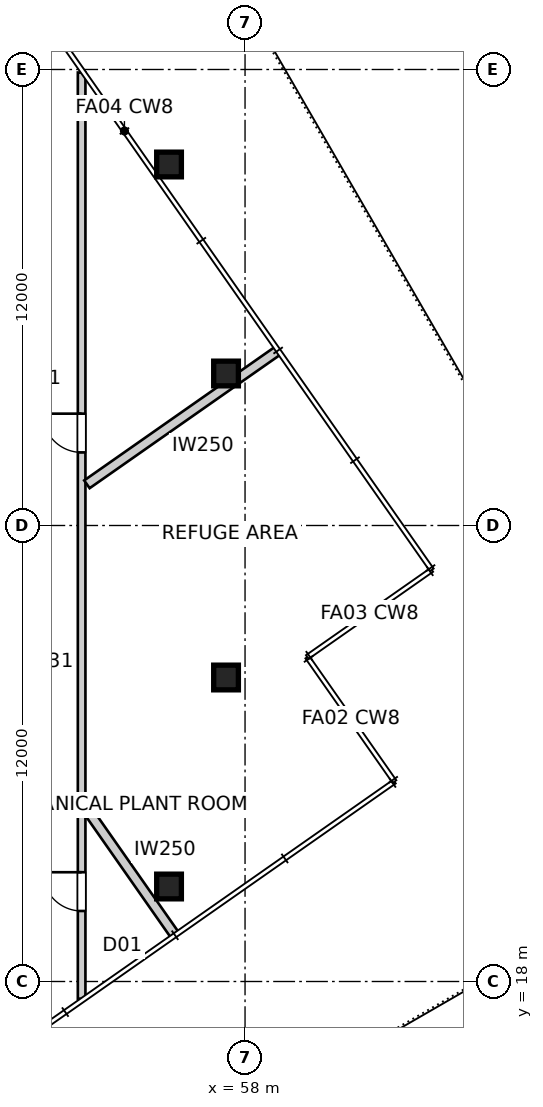
"""IFC4 building model, lengths in metres.
Left out: names, types, materials, properties, quantities, classifications, styles, units other than length and angle.
Written with IfcOpenShell. Run it as: python <this file> out.ifc"""

import sys

from ifc_helpers import new_model, si_unit, direction, frame, frame_2d, origin, origin_2d, place, context, subcontext, project, spatial, rectangle, extrude, element, fill, save


model = new_model("IFC4")
c1 = context("Model", 3, precision=1e-05, world=origin(), true_north=direction((0.0, 1.0)))
c2 = subcontext(c1, "Body", "Model", "MODEL_VIEW")
j1 = project(units=[si_unit("LENGTHUNIT", "METRE"), si_unit("PLANEANGLEUNIT", "RADIAN")], contexts=[c1])
p1 = place(None, origin())
s1 = spatial("IfcSite", under=j1, at=p1, CompositionType="ELEMENT")
p2 = place(p1, origin())
s2 = spatial("IfcBuilding", under=s1, at=p2, CompositionType="ELEMENT")
p3 = place(p2, frame((0.0, 0.0, 235.4)))
s3 = spatial("IfcBuildingStorey", under=s2, at=p3, CompositionType="ELEMENT", Elevation=235.4)
for number, where, z_axis, x_axis in (
    (1, (57.5, 26.0, 0.0), (0.0, 0.0, 1.0), (1.0, 0.0, 0.0)),
    (2, (57.5, 34.0, 0.0), (0.0, 0.0, 1.0), (1.0, 0.0, 0.0)),
    (3, (56.0, 39.5, 0.0), (0.0, 0.0, 1.0), (1.0, 0.0, 0.0)),
    (4, (56.0, 20.5, 0.0), (0.0, 0.0, 1.0), (1.0, 0.0, 0.0)),
):
    element("IfcColumn", number, at=place(p3, frame(where, z_axis=z_axis, x_axis=x_axis)), inside=s3, PredefinedType="COLUMN", context=c2, shape_type="SweptSolid", body=[
        extrude(rectangle(XDim=0.65, YDim=0.65, at=origin_2d()), origin(), (0.0, 0.0, 1.0), 5.0),
    ])
p4 = place(p3, frame((53.7, 17.546, 0.0), z_axis=(0.0, 0.0, 1.0), x_axis=(0.0, 1.0, 0.0)))
e5 = element("IfcWall", 5, at=p4, inside=s3, PredefinedType="PARTITIONING", context=c2, shape_type="SweptSolid", body=[
    extrude(rectangle(XDim=24.375, YDim=0.2, at=frame_2d((12.188, 0.0))), origin(), (0.0, 0.0, 1.0), 4.85),
])
p5 = place(p4, frame((14.377, 0.0, 0.0)))
e6 = element("IfcOpeningElement", 6, at=p5, cuts=e5, PredefinedType="OPENING", context=c2, shape_type="SweptSolid", body=[
    extrude(rectangle(XDim=1.02, YDim=2.34, at=frame_2d((0.51, 1.17))), frame((0.0, 0.11, 0.0), z_axis=(0.0, -1.0, 0.0), x_axis=(1.0, 0.0, 0.0)), (0.0, 0.0, 1.0), 0.22),
])
p6 = place(p4, frame((2.31, 0.0, 0.0)))
e7 = element("IfcOpeningElement", 7, at=p6, cuts=e5, PredefinedType="OPENING", context=c2, shape_type="SweptSolid", body=[
    extrude(rectangle(XDim=1.02, YDim=2.34, at=frame_2d((0.51, 1.17))), frame((0.0, 0.11, 0.0), z_axis=(0.0, -1.0, 0.0), x_axis=(1.0, 0.0, 0.0)), (0.0, 0.0, 1.0), 0.22),
])
p7 = place(p3, frame((56.157, 19.217, 0.0), z_axis=(0.0, 0.0, 1.0), x_axis=(-0.573569635732, 0.819156806092, 0.0)))
e8 = element("IfcWall", 8, at=p7, inside=s3, PredefinedType="PARTITIONING", context=c2, shape_type="SweptSolid", body=[
    extrude(rectangle(XDim=3.97, YDim=0.25, at=frame_2d((1.985, 0.0))), origin(), (0.0, 0.0, 1.0), 4.85),
])
p8 = place(p3, frame((58.87, 34.607, 0.0), z_axis=(0.0, 0.0, 1.0), x_axis=(-0.819162822725, -0.573561042841, 0.0)))
e9 = element("IfcWall", 9, at=p8, inside=s3, PredefinedType="PARTITIONING", context=c2, shape_type="SweptSolid", body=[
    extrude(rectangle(XDim=6.142, YDim=0.25, at=frame_2d((3.071, 0.0))), origin(), (0.0, 0.0, 1.0), 4.85),
])
p9 = place(p5, origin())
e10 = element("IfcDoor", 10, at=p9, inside=s3, OperationType="SINGLE_SWING_RIGHT", PredefinedType="DOOR", context=c2, shape_type="SweptSolid", body=[
    extrude(rectangle(XDim=1.02, YDim=2.34, at=frame_2d((0.51, 1.17))), frame((0.0, 0.025, 0.0), z_axis=(0.0, -1.0, 0.0), x_axis=(1.0, 0.0, 0.0)), (0.0, 0.0, 1.0), 0.05),
])
fill(e6, e10)
p10 = place(p6, origin())
e11 = element("IfcDoor", 11, at=p10, inside=s3, OperationType="SINGLE_SWING_RIGHT", PredefinedType="DOOR", context=c2, shape_type="SweptSolid", body=[
    extrude(rectangle(XDim=1.02, YDim=2.34, at=frame_2d((0.51, 1.17))), frame((0.0, 0.025, 0.0), z_axis=(0.0, -1.0, 0.0), x_axis=(1.0, 0.0, 0.0)), (0.0, 0.0, 1.0), 0.05),
])
fill(e7, e11)
save(model, sys.argv[1])
